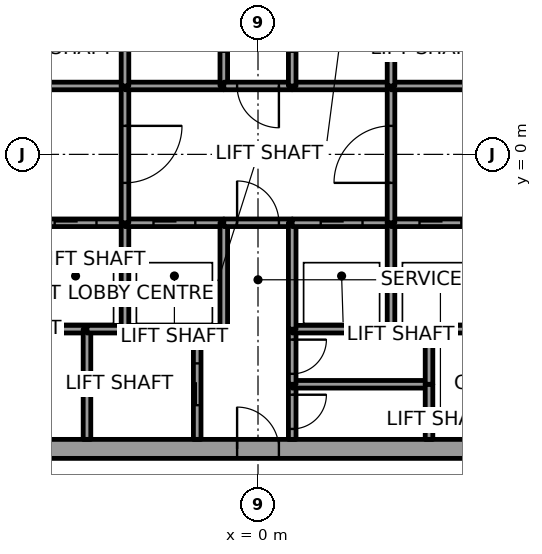
"""IFC4 building model, lengths in metres.
Left out: names, types, materials, properties, quantities, classifications, styles, units other than length and angle.
Written with IfcOpenShell. Run it as: python <this file> out.ifc"""

import sys

from ifc_helpers import new_model, si_unit, direction, frame, frame_2d, origin, place, context, subcontext, project, spatial, rectangle, extrude, element, fill, save


model = new_model("IFC4")
c1 = context("Model", 3, precision=1e-05, world=origin(), true_north=direction((0.0, 1.0)))
c2 = subcontext(c1, "Body", "Model", "MODEL_VIEW")
j1 = project(units=[si_unit("LENGTHUNIT", "METRE"), si_unit("PLANEANGLEUNIT", "RADIAN")], contexts=[c1])
p1 = place(None, origin())
s1 = spatial("IfcSite", under=j1, at=p1, CompositionType="ELEMENT")
p2 = place(p1, origin())
s2 = spatial("IfcBuilding", under=s1, at=p2, CompositionType="ELEMENT")
p3 = place(p2, frame((0.0, 0.0, 137.8)))
s3 = spatial("IfcBuildingStorey", under=s2, at=p3, CompositionType="ELEMENT", Elevation=137.8)
p4 = place(p3, frame((-11.0, -7.75, 0.0), z_axis=(0.0, 0.0, 1.0), x_axis=(1.0, 0.0, 0.0)))
e1 = element("IfcWall", 1, at=p4, inside=s3, PredefinedType="SHEAR", context=c2, shape_type="SweptSolid", body=[
    extrude(rectangle(XDim=22.0, YDim=0.5, at=frame_2d((11.0, 0.0))), origin(), (0.0, 0.0, 1.0), 4.0),
])
p5 = place(p4, frame((10.45, 0.0, 0.0)))
e2 = element("IfcOpeningElement", 2, at=p5, cuts=e1, PredefinedType="OPENING", context=c2, shape_type="SweptSolid", body=[
    extrude(rectangle(XDim=1.1, YDim=2.1, at=frame_2d((0.55, 1.05))), frame((0.0, 0.25, 0.0), z_axis=(0.0, -1.0, 0.0), x_axis=(1.0, 0.0, 0.0)), (0.0, 0.0, 1.0), 0.5),
])
p6 = place(p3, frame((-6.1, -4.6, 0.0), z_axis=(0.0, 0.0, 1.0), x_axis=(1.0, 0.0, 0.0)))
e3 = element("IfcWall", 3, at=p6, inside=s3, PredefinedType="SOLIDWALL", context=c2, shape_type="SweptSolid", body=[
    extrude(rectangle(XDim=1.6, YDim=0.2, at=frame_2d((0.8, 0.0))), origin(), (0.0, 0.0, 1.0), 3.85),
])
p7 = place(p3, frame((-6.1, -1.8, 0.0), z_axis=(0.0, 0.0, 1.0), x_axis=(1.0, 0.0, 0.0)))
e4 = element("IfcWall", 4, at=p7, inside=s3, PredefinedType="SOLIDWALL", context=c2, shape_type="SweptSolid", body=[
    extrude(rectangle(XDim=2.6, YDim=0.2, at=frame_2d((1.3, 0.0))), origin(), (0.0, 0.0, 1.0), 3.85),
])
p8 = place(p7, frame((0.75, 0.0, 0.0)))
e5 = element("IfcOpeningElement", 5, at=p8, cuts=e4, PredefinedType="OPENING", context=c2, shape_type="SweptSolid", body=[
    extrude(rectangle(XDim=1.1, YDim=2.1, at=frame_2d((0.55, 1.05))), frame((0.0, 0.1, 0.0), z_axis=(0.0, -1.0, 0.0), x_axis=(1.0, 0.0, 0.0)), (0.0, 0.0, 1.0), 0.2),
])
p9 = place(p3, frame((-3.5, 1.8, 0.0), z_axis=(0.0, 0.0, 1.0), x_axis=(-1.0, 0.0, 0.0)))
e6 = element("IfcWall", 6, at=p9, inside=s3, PredefinedType="SOLIDWALL", context=c2, shape_type="SweptSolid", body=[
    extrude(rectangle(XDim=2.6, YDim=0.2, at=frame_2d((1.3, 0.0))), origin(), (0.0, 0.0, 1.0), 3.85),
])
p10 = place(p3, frame((-4.5, -4.6, 0.0), z_axis=(0.0, 0.0, 1.0), x_axis=(0.0, -1.0, 0.0)))
e7 = element("IfcWall", 7, at=p10, inside=s3, PredefinedType="SOLIDWALL", context=c2, shape_type="SweptSolid", body=[
    extrude(rectangle(XDim=2.9, YDim=0.2, at=frame_2d((1.45, 0.0))), origin(), (0.0, 0.0, 1.0), 3.85),
])
p11 = place(p3, frame((-4.5, -4.6, 0.0), z_axis=(0.0, 0.0, 1.0), x_axis=(1.0, 0.0, 0.0)))
e8 = element("IfcWall", 8, at=p11, inside=s3, PredefinedType="SOLIDWALL", context=c2, shape_type="SweptSolid", body=[
    extrude(rectangle(XDim=1.0, YDim=0.2, at=frame_2d((0.5, 0.0))), origin(), (0.0, 0.0, 1.0), 3.85),
])
p12 = place(p3, frame((-3.5, -4.6, 0.0), z_axis=(0.0, 0.0, 1.0), x_axis=(1.0, 0.0, 0.0)))
e9 = element("IfcWall", 9, at=p12, inside=s3, PredefinedType="SOLIDWALL", context=c2, shape_type="SweptSolid", body=[
    extrude(rectangle(XDim=1.9, YDim=0.2, at=frame_2d((0.95, 0.0))), origin(), (0.0, 0.0, 1.0), 3.85),
])
p13 = place(p3, frame((-3.5, -4.6, 0.0), z_axis=(0.0, 0.0, 1.0), x_axis=(0.0, 1.0, 0.0)))
e10 = element("IfcWall", 10, at=p13, inside=s3, PredefinedType="SOLIDWALL", context=c2, shape_type="SweptSolid", body=[
    extrude(rectangle(XDim=2.8, YDim=0.2, at=frame_2d((1.4, 0.0))), origin(), (0.0, 0.0, 1.0), 3.85),
])
p14 = place(p3, frame((-3.5, -1.8, 0.0), z_axis=(0.0, 0.0, 1.0), x_axis=(1.0, 0.0, 0.0)))
e11 = element("IfcWall", 11, at=p14, inside=s3, PredefinedType="SOLIDWALL", context=c2, shape_type="SweptSolid", body=[
    extrude(rectangle(XDim=2.6, YDim=0.2, at=frame_2d((1.3, 0.0))), origin(), (0.0, 0.0, 1.0), 3.85),
])
p15 = place(p14, frame((0.75, 0.0, 0.0)))
e12 = element("IfcOpeningElement", 12, at=p15, cuts=e11, PredefinedType="OPENING", context=c2, shape_type="SweptSolid", body=[
    extrude(rectangle(XDim=1.1, YDim=2.1, at=frame_2d((0.55, 1.05))), frame((0.0, 0.1, 0.0), z_axis=(0.0, -1.0, 0.0), x_axis=(1.0, 0.0, 0.0)), (0.0, 0.0, 1.0), 0.2),
])
p16 = place(p3, frame((-3.5, 1.8, 0.0), z_axis=(0.0, 0.0, 1.0), x_axis=(0.0, -1.0, 0.0)))
e13 = element("IfcWall", 13, at=p16, inside=s3, PredefinedType="SOLIDWALL", context=c2, shape_type="SweptSolid", body=[
    extrude(rectangle(XDim=3.6, YDim=0.2, at=frame_2d((1.8, 0.0))), origin(), (0.0, 0.0, 1.0), 3.85),
])
p17 = place(p16, frame((1.05, 0.0, 0.0)))
e14 = element("IfcOpeningElement", 14, at=p17, cuts=e13, PredefinedType="OPENING", context=c2, shape_type="SweptSolid", body=[
    extrude(rectangle(XDim=1.5, YDim=2.1, at=frame_2d((0.75, 1.05))), frame((0.0, 0.1, 0.0), z_axis=(0.0, -1.0, 0.0), x_axis=(1.0, 0.0, 0.0)), (0.0, 0.0, 1.0), 0.2),
])
p18 = place(p3, frame((-0.9, 1.8, 0.0), z_axis=(0.0, 0.0, 1.0), x_axis=(-1.0, 0.0, 0.0)))
e15 = element("IfcWall", 15, at=p18, inside=s3, PredefinedType="SOLIDWALL", context=c2, shape_type="SweptSolid", body=[
    extrude(rectangle(XDim=2.6, YDim=0.2, at=frame_2d((1.3, 0.0))), origin(), (0.0, 0.0, 1.0), 3.85),
])
p19 = place(p3, frame((-3.5, 4.6, 0.0), z_axis=(0.0, 0.0, 1.0), x_axis=(0.0, -1.0, 0.0)))
e16 = element("IfcWall", 16, at=p19, inside=s3, PredefinedType="SOLIDWALL", context=c2, shape_type="SweptSolid", body=[
    extrude(rectangle(XDim=2.8, YDim=0.2, at=frame_2d((1.4, 0.0))), origin(), (0.0, 0.0, 1.0), 3.85),
])
p20 = place(p3, frame((-0.9, 1.8, 0.0), z_axis=(0.0, 0.0, 1.0), x_axis=(0.0, 1.0, 0.0)))
e17 = element("IfcWall", 17, at=p20, inside=s3, PredefinedType="SOLIDWALL", context=c2, shape_type="SweptSolid", body=[
    extrude(rectangle(XDim=3.0, YDim=0.2, at=frame_2d((1.5, 0.0))), origin(), (0.0, 0.0, 1.0), 3.85),
])
p21 = place(p20, frame((0.9, 0.0, 0.0)))
e18 = element("IfcOpeningElement", 18, at=p21, cuts=e17, PredefinedType="OPENING", context=c2, shape_type="SweptSolid", body=[
    extrude(rectangle(XDim=1.2, YDim=2.1, at=frame_2d((0.6, 1.05))), frame((0.0, 0.1, 0.0), z_axis=(0.0, -1.0, 0.0), x_axis=(1.0, 0.0, 0.0)), (0.0, 0.0, 1.0), 0.2),
])
p22 = place(p3, frame((-1.6, -7.5, 0.0), z_axis=(0.0, 0.0, 1.0), x_axis=(0.0, 1.0, 0.0)))
e19 = element("IfcWall", 19, at=p22, inside=s3, PredefinedType="SOLIDWALL", context=c2, shape_type="SweptSolid", body=[
    extrude(rectangle(XDim=2.9, YDim=0.2, at=frame_2d((1.45, 0.0))), origin(), (0.0, 0.0, 1.0), 3.85),
])
p23 = place(p22, frame((0.9, 0.0, 0.0)))
e20 = element("IfcOpeningElement", 20, at=p23, cuts=e19, PredefinedType="OPENING", context=c2, shape_type="SweptSolid", body=[
    extrude(rectangle(XDim=1.1, YDim=2.1, at=frame_2d((0.55, 1.05))), frame((0.0, 0.1, 0.0), z_axis=(0.0, -1.0, 0.0), x_axis=(1.0, 0.0, 0.0)), (0.0, 0.0, 1.0), 0.2),
])
p24 = place(p3, frame((-1.6, -4.6, 0.0), z_axis=(0.0, 0.0, 1.0), x_axis=(1.0, 0.0, 0.0)))
e21 = element("IfcWall", 21, at=p24, inside=s3, PredefinedType="SOLIDWALL", context=c2, shape_type="SweptSolid", body=[
    extrude(rectangle(XDim=0.7, YDim=0.2, at=frame_2d((0.35, 0.0))), origin(), (0.0, 0.0, 1.0), 3.85),
])
p25 = place(p3, frame((-0.9, -4.6, 0.0), z_axis=(0.0, 0.0, 1.0), x_axis=(0.0, 1.0, 0.0)))
e22 = element("IfcWall", 22, at=p25, inside=s3, PredefinedType="SOLIDWALL", context=c2, shape_type="SweptSolid", body=[
    extrude(rectangle(XDim=2.8, YDim=0.2, at=frame_2d((1.4, 0.0))), origin(), (0.0, 0.0, 1.0), 3.85),
])
p26 = place(p3, frame((-0.9, -1.8, 0.0), z_axis=(0.0, 0.0, 1.0), x_axis=(1.0, 0.0, 0.0)))
e23 = element("IfcWall", 23, at=p26, inside=s3, PredefinedType="SOLIDWALL", context=c2, shape_type="SweptSolid", body=[
    extrude(rectangle(XDim=1.8, YDim=0.2, at=frame_2d((0.9, 0.0))), origin(), (0.0, 0.0, 1.0), 3.85),
])
p27 = place(p26, frame((0.35, 0.0, 0.0)))
e24 = element("IfcOpeningElement", 24, at=p27, cuts=e23, PredefinedType="OPENING", context=c2, shape_type="SweptSolid", body=[
    extrude(rectangle(XDim=1.1, YDim=2.1, at=frame_2d((0.55, 1.05))), frame((0.0, 0.1, 0.0), z_axis=(0.0, -1.0, 0.0), x_axis=(1.0, 0.0, 0.0)), (0.0, 0.0, 1.0), 0.2),
])
p28 = place(p3, frame((0.9, 1.8, 0.0), z_axis=(0.0, 0.0, 1.0), x_axis=(-1.0, 0.0, 0.0)))
e25 = element("IfcWall", 25, at=p28, inside=s3, PredefinedType="SOLIDWALL", context=c2, shape_type="SweptSolid", body=[
    extrude(rectangle(XDim=1.8, YDim=0.2, at=frame_2d((0.9, 0.0))), origin(), (0.0, 0.0, 1.0), 3.85),
])
p29 = place(p28, frame((0.35, 0.0, 0.0)))
e26 = element("IfcOpeningElement", 26, at=p29, cuts=e25, PredefinedType="OPENING", context=c2, shape_type="SweptSolid", body=[
    extrude(rectangle(XDim=1.1, YDim=2.1, at=frame_2d((0.55, 1.05))), frame((0.0, 0.1, 0.0), z_axis=(0.0, -1.0, 0.0), x_axis=(1.0, 0.0, 0.0)), (0.0, 0.0, 1.0), 0.2),
])
p30 = place(p3, frame((0.9, -6.05, 0.0), z_axis=(0.0, 0.0, 1.0), x_axis=(0.0, -1.0, 0.0)))
e27 = element("IfcWall", 27, at=p30, inside=s3, PredefinedType="SOLIDWALL", context=c2, shape_type="SweptSolid", body=[
    extrude(rectangle(XDim=1.45, YDim=0.2, at=frame_2d((0.725, 0.0))), origin(), (0.0, 0.0, 1.0), 3.85),
])
p31 = place(p30, frame((0.275, 0.0, 0.0)))
e28 = element("IfcOpeningElement", 28, at=p31, cuts=e27, PredefinedType="OPENING", context=c2, shape_type="SweptSolid", body=[
    extrude(rectangle(XDim=0.9, YDim=2.1, at=frame_2d((0.45, 1.05))), frame((0.0, 0.1, 0.0), z_axis=(0.0, -1.0, 0.0), x_axis=(1.0, 0.0, 0.0)), (0.0, 0.0, 1.0), 0.2),
])
p32 = place(p3, frame((4.5, -6.05, 0.0), z_axis=(0.0, 0.0, 1.0), x_axis=(-1.0, 0.0, 0.0)))
e29 = element("IfcWall", 29, at=p32, inside=s3, PredefinedType="SOLIDWALL", context=c2, shape_type="SweptSolid", body=[
    extrude(rectangle(XDim=3.6, YDim=0.2, at=frame_2d((1.8, 0.0))), origin(), (0.0, 0.0, 1.0), 3.85),
])
p33 = place(p3, frame((0.9, -4.6, 0.0), z_axis=(0.0, 0.0, 1.0), x_axis=(0.0, -1.0, 0.0)))
e30 = element("IfcWall", 30, at=p33, inside=s3, PredefinedType="SOLIDWALL", context=c2, shape_type="SweptSolid", body=[
    extrude(rectangle(XDim=1.45, YDim=0.2, at=frame_2d((0.725, 0.0))), origin(), (0.0, 0.0, 1.0), 3.85),
])
p34 = place(p33, frame((0.275, 0.0, 0.0)))
e31 = element("IfcOpeningElement", 31, at=p34, cuts=e30, PredefinedType="OPENING", context=c2, shape_type="SweptSolid", body=[
    extrude(rectangle(XDim=0.9, YDim=2.1, at=frame_2d((0.45, 1.05))), frame((0.0, 0.1, 0.0), z_axis=(0.0, -1.0, 0.0), x_axis=(1.0, 0.0, 0.0)), (0.0, 0.0, 1.0), 0.2),
])
p35 = place(p3, frame((3.5, -4.6, 0.0), z_axis=(0.0, 0.0, 1.0), x_axis=(-1.0, 0.0, 0.0)))
e32 = element("IfcWall", 32, at=p35, inside=s3, PredefinedType="SOLIDWALL", context=c2, shape_type="SweptSolid", body=[
    extrude(rectangle(XDim=2.6, YDim=0.2, at=frame_2d((1.3, 0.0))), origin(), (0.0, 0.0, 1.0), 3.85),
])
p36 = place(p3, frame((0.9, -1.8, 0.0), z_axis=(0.0, 0.0, 1.0), x_axis=(0.0, -1.0, 0.0)))
e33 = element("IfcWall", 33, at=p36, inside=s3, PredefinedType="SOLIDWALL", context=c2, shape_type="SweptSolid", body=[
    extrude(rectangle(XDim=2.8, YDim=0.2, at=frame_2d((1.4, 0.0))), origin(), (0.0, 0.0, 1.0), 3.85),
])
p37 = place(p3, frame((0.9, -1.8, 0.0), z_axis=(0.0, 0.0, 1.0), x_axis=(1.0, 0.0, 0.0)))
e34 = element("IfcWall", 34, at=p37, inside=s3, PredefinedType="SOLIDWALL", context=c2, shape_type="SweptSolid", body=[
    extrude(rectangle(XDim=2.6, YDim=0.2, at=frame_2d((1.3, 0.0))), origin(), (0.0, 0.0, 1.0), 3.85),
])
p38 = place(p37, frame((0.75, 0.0, 0.0)))
e35 = element("IfcOpeningElement", 35, at=p38, cuts=e34, PredefinedType="OPENING", context=c2, shape_type="SweptSolid", body=[
    extrude(rectangle(XDim=1.1, YDim=2.1, at=frame_2d((0.55, 1.05))), frame((0.0, 0.1, 0.0), z_axis=(0.0, -1.0, 0.0), x_axis=(1.0, 0.0, 0.0)), (0.0, 0.0, 1.0), 0.2),
])
p39 = place(p3, frame((3.5, 1.8, 0.0), z_axis=(0.0, 0.0, 1.0), x_axis=(-1.0, 0.0, 0.0)))
e36 = element("IfcWall", 36, at=p39, inside=s3, PredefinedType="SOLIDWALL", context=c2, shape_type="SweptSolid", body=[
    extrude(rectangle(XDim=2.6, YDim=0.2, at=frame_2d((1.3, 0.0))), origin(), (0.0, 0.0, 1.0), 3.85),
])
p40 = place(p3, frame((0.9, 4.8, 0.0), z_axis=(0.0, 0.0, 1.0), x_axis=(0.0, -1.0, 0.0)))
e37 = element("IfcWall", 37, at=p40, inside=s3, PredefinedType="SOLIDWALL", context=c2, shape_type="SweptSolid", body=[
    extrude(rectangle(XDim=3.0, YDim=0.2, at=frame_2d((1.5, 0.0))), origin(), (0.0, 0.0, 1.0), 3.85),
])
p41 = place(p40, frame((0.9, 0.0, 0.0)))
e38 = element("IfcOpeningElement", 38, at=p41, cuts=e37, PredefinedType="OPENING", context=c2, shape_type="SweptSolid", body=[
    extrude(rectangle(XDim=1.2, YDim=2.1, at=frame_2d((0.6, 1.05))), frame((0.0, 0.1, 0.0), z_axis=(0.0, -1.0, 0.0), x_axis=(1.0, 0.0, 0.0)), (0.0, 0.0, 1.0), 0.2),
])
p42 = place(p3, frame((4.5, -4.6, 0.0), z_axis=(0.0, 0.0, 1.0), x_axis=(-1.0, 0.0, 0.0)))
e39 = element("IfcWall", 39, at=p42, inside=s3, PredefinedType="SOLIDWALL", context=c2, shape_type="SweptSolid", body=[
    extrude(rectangle(XDim=1.0, YDim=0.2, at=frame_2d((0.5, 0.0))), origin(), (0.0, 0.0, 1.0), 3.85),
])
p43 = place(p3, frame((3.5, -4.6, 0.0), z_axis=(0.0, 0.0, 1.0), x_axis=(0.0, 1.0, 0.0)))
e40 = element("IfcWall", 40, at=p43, inside=s3, PredefinedType="SOLIDWALL", context=c2, shape_type="SweptSolid", body=[
    extrude(rectangle(XDim=2.8, YDim=0.2, at=frame_2d((1.4, 0.0))), origin(), (0.0, 0.0, 1.0), 3.85),
])
p44 = place(p3, frame((3.5, -1.8, 0.0), z_axis=(0.0, 0.0, 1.0), x_axis=(1.0, 0.0, 0.0)))
e41 = element("IfcWall", 41, at=p44, inside=s3, PredefinedType="SOLIDWALL", context=c2, shape_type="SweptSolid", body=[
    extrude(rectangle(XDim=2.6, YDim=0.2, at=frame_2d((1.3, 0.0))), origin(), (0.0, 0.0, 1.0), 3.85),
])
p45 = place(p44, frame((0.75, 0.0, 0.0)))
e42 = element("IfcOpeningElement", 42, at=p45, cuts=e41, PredefinedType="OPENING", context=c2, shape_type="SweptSolid", body=[
    extrude(rectangle(XDim=1.1, YDim=2.1, at=frame_2d((0.55, 1.05))), frame((0.0, 0.1, 0.0), z_axis=(0.0, -1.0, 0.0), x_axis=(1.0, 0.0, 0.0)), (0.0, 0.0, 1.0), 0.2),
])
p46 = place(p3, frame((3.5, -1.8, 0.0), z_axis=(0.0, 0.0, 1.0), x_axis=(0.0, 1.0, 0.0)))
e43 = element("IfcWall", 43, at=p46, inside=s3, PredefinedType="SOLIDWALL", context=c2, shape_type="SweptSolid", body=[
    extrude(rectangle(XDim=3.6, YDim=0.2, at=frame_2d((1.8, 0.0))), origin(), (0.0, 0.0, 1.0), 3.85),
])
p47 = place(p46, frame((1.05, 0.0, 0.0)))
e44 = element("IfcOpeningElement", 44, at=p47, cuts=e43, PredefinedType="OPENING", context=c2, shape_type="SweptSolid", body=[
    extrude(rectangle(XDim=1.5, YDim=2.1, at=frame_2d((0.75, 1.05))), frame((0.0, 0.1, 0.0), z_axis=(0.0, -1.0, 0.0), x_axis=(1.0, 0.0, 0.0)), (0.0, 0.0, 1.0), 0.2),
])
p48 = place(p3, frame((6.1, 1.8, 0.0), z_axis=(0.0, 0.0, 1.0), x_axis=(-1.0, 0.0, 0.0)))
e45 = element("IfcWall", 45, at=p48, inside=s3, PredefinedType="SOLIDWALL", context=c2, shape_type="SweptSolid", body=[
    extrude(rectangle(XDim=2.6, YDim=0.2, at=frame_2d((1.3, 0.0))), origin(), (0.0, 0.0, 1.0), 3.85),
])
p49 = place(p3, frame((3.5, 1.8, 0.0), z_axis=(0.0, 0.0, 1.0), x_axis=(0.0, 1.0, 0.0)))
e46 = element("IfcWall", 46, at=p49, inside=s3, PredefinedType="SOLIDWALL", context=c2, shape_type="SweptSolid", body=[
    extrude(rectangle(XDim=2.8, YDim=0.2, at=frame_2d((1.4, 0.0))), origin(), (0.0, 0.0, 1.0), 3.85),
])
for number, where, z_axis, x_axis in (
    (47, (4.5, -6.05, 0.0), (0.0, 0.0, 1.0), (0.0, -1.0, 0.0)),
    (48, (4.5, -4.6, 0.0), (0.0, 0.0, 1.0), (0.0, -1.0, 0.0)),
):
    element("IfcWall", number, at=place(p3, frame(where, z_axis=z_axis, x_axis=x_axis)), inside=s3, PredefinedType="SOLIDWALL", context=c2, shape_type="SweptSolid", body=[
        extrude(rectangle(XDim=1.45, YDim=0.2, at=frame_2d((0.725, 0.0))), origin(), (0.0, 0.0, 1.0), 3.85),
    ])
p50 = place(p3, frame((6.1, -4.6, 0.0), z_axis=(0.0, 0.0, 1.0), x_axis=(-1.0, 0.0, 0.0)))
e49 = element("IfcWall", 49, at=p50, inside=s3, PredefinedType="SOLIDWALL", context=c2, shape_type="SweptSolid", body=[
    extrude(rectangle(XDim=1.6, YDim=0.2, at=frame_2d((0.8, 0.0))), origin(), (0.0, 0.0, 1.0), 3.85),
])
p51 = place(p8, origin())
e50 = element("IfcDoor", 50, at=p51, inside=s3, OperationType="SLIDING_TO_LEFT", PredefinedType="DOOR", context=c2, shape_type="SweptSolid", body=[
    extrude(rectangle(XDim=1.1, YDim=2.1, at=frame_2d((0.55, 1.05))), frame((0.0, 0.025, 0.0), z_axis=(0.0, -1.0, 0.0), x_axis=(1.0, 0.0, 0.0)), (0.0, 0.0, 1.0), 0.05),
])
fill(e5, e50)
p52 = place(p15, origin())
e51 = element("IfcDoor", 51, at=p52, inside=s3, OperationType="SLIDING_TO_RIGHT", PredefinedType="DOOR", context=c2, shape_type="SweptSolid", body=[
    extrude(rectangle(XDim=1.1, YDim=2.1, at=frame_2d((0.55, 1.05))), frame((0.0, 0.025, 0.0), z_axis=(0.0, -1.0, 0.0), x_axis=(1.0, 0.0, 0.0)), (0.0, 0.0, 1.0), 0.05),
])
fill(e12, e51)
p53 = place(p38, origin())
e52 = element("IfcDoor", 52, at=p53, inside=s3, OperationType="SLIDING_TO_RIGHT", PredefinedType="DOOR", context=c2, shape_type="SweptSolid", body=[
    extrude(rectangle(XDim=1.1, YDim=2.1, at=frame_2d((0.55, 1.05))), frame((0.0, 0.025, 0.0), z_axis=(0.0, -1.0, 0.0), x_axis=(1.0, 0.0, 0.0)), (0.0, 0.0, 1.0), 0.05),
])
fill(e35, e52)
p54 = place(p45, origin())
e53 = element("IfcDoor", 53, at=p54, inside=s3, OperationType="SLIDING_TO_RIGHT", PredefinedType="DOOR", context=c2, shape_type="SweptSolid", body=[
    extrude(rectangle(XDim=1.1, YDim=2.1, at=frame_2d((0.55, 1.05))), frame((0.0, 0.025, 0.0), z_axis=(0.0, -1.0, 0.0), x_axis=(1.0, 0.0, 0.0)), (0.0, 0.0, 1.0), 0.05),
])
fill(e42, e53)
p55 = place(p23, origin())
e54 = element("IfcDoor", 54, at=p55, inside=s3, OperationType="SLIDING_TO_LEFT", PredefinedType="DOOR", context=c2, shape_type="SweptSolid", body=[
    extrude(rectangle(XDim=1.1, YDim=2.1, at=frame_2d((0.55, 1.05))), frame((0.0, 0.025, 0.0), z_axis=(0.0, -1.0, 0.0), x_axis=(1.0, 0.0, 0.0)), (0.0, 0.0, 1.0), 0.05),
])
fill(e20, e54)
p56 = place(p17, origin())
e55 = element("IfcDoor", 55, at=p56, inside=s3, OperationType="DOUBLE_DOOR_SINGLE_SWING", PredefinedType="DOOR", context=c2, shape_type="SweptSolid", body=[
    extrude(rectangle(XDim=1.5, YDim=2.1, at=frame_2d((0.75, 1.05))), frame((0.0, 0.025, 0.0), z_axis=(0.0, -1.0, 0.0), x_axis=(1.0, 0.0, 0.0)), (0.0, 0.0, 1.0), 0.05),
])
fill(e14, e55)
p57 = place(p47, origin())
e56 = element("IfcDoor", 56, at=p57, inside=s3, OperationType="DOUBLE_DOOR_SINGLE_SWING", PredefinedType="DOOR", context=c2, shape_type="SweptSolid", body=[
    extrude(rectangle(XDim=1.5, YDim=2.1, at=frame_2d((0.75, 1.05))), frame((0.0, 0.025, 0.0), z_axis=(0.0, -1.0, 0.0), x_axis=(1.0, 0.0, 0.0)), (0.0, 0.0, 1.0), 0.05),
])
fill(e44, e56)
p58 = place(p29, origin())
e57 = element("IfcDoor", 57, at=p58, inside=s3, OperationType="SINGLE_SWING_LEFT", PredefinedType="DOOR", context=c2, shape_type="SweptSolid", body=[
    extrude(rectangle(XDim=1.1, YDim=2.1, at=frame_2d((0.55, 1.05))), frame((0.0, 0.025, 0.0), z_axis=(0.0, -1.0, 0.0), x_axis=(1.0, 0.0, 0.0)), (0.0, 0.0, 1.0), 0.05),
])
fill(e26, e57)
p59 = place(p27, origin())
e58 = element("IfcDoor", 58, at=p59, inside=s3, OperationType="SINGLE_SWING_LEFT", PredefinedType="DOOR", context=c2, shape_type="SweptSolid", body=[
    extrude(rectangle(XDim=1.1, YDim=2.1, at=frame_2d((0.55, 1.05))), frame((0.0, 0.025, 0.0), z_axis=(0.0, -1.0, 0.0), x_axis=(1.0, 0.0, 0.0)), (0.0, 0.0, 1.0), 0.05),
])
fill(e24, e58)
p60 = place(p31, origin())
e59 = element("IfcDoor", 59, at=p60, inside=s3, OperationType="SINGLE_SWING_LEFT", PredefinedType="DOOR", context=c2, shape_type="SweptSolid", body=[
    extrude(rectangle(XDim=0.9, YDim=2.1, at=frame_2d((0.45, 1.05))), frame((0.0, 0.025, 0.0), z_axis=(0.0, -1.0, 0.0), x_axis=(1.0, 0.0, 0.0)), (0.0, 0.0, 1.0), 0.05),
])
fill(e28, e59)
p61 = place(p34, origin())
e60 = element("IfcDoor", 60, at=p61, inside=s3, OperationType="SINGLE_SWING_LEFT", PredefinedType="DOOR", context=c2, shape_type="SweptSolid", body=[
    extrude(rectangle(XDim=0.9, YDim=2.1, at=frame_2d((0.45, 1.05))), frame((0.0, 0.025, 0.0), z_axis=(0.0, -1.0, 0.0), x_axis=(1.0, 0.0, 0.0)), (0.0, 0.0, 1.0), 0.05),
])
fill(e31, e60)
p62 = place(p5, origin())
e61 = element("IfcDoor", 61, at=p62, inside=s3, OperationType="SINGLE_SWING_RIGHT", PredefinedType="DOOR", context=c2, shape_type="SweptSolid", body=[
    extrude(rectangle(XDim=1.1, YDim=2.1, at=frame_2d((0.55, 1.05))), frame((0.0, 0.025, 0.0), z_axis=(0.0, -1.0, 0.0), x_axis=(1.0, 0.0, 0.0)), (0.0, 0.0, 1.0), 0.05),
])
fill(e2, e61)
save(model, sys.argv[1])
